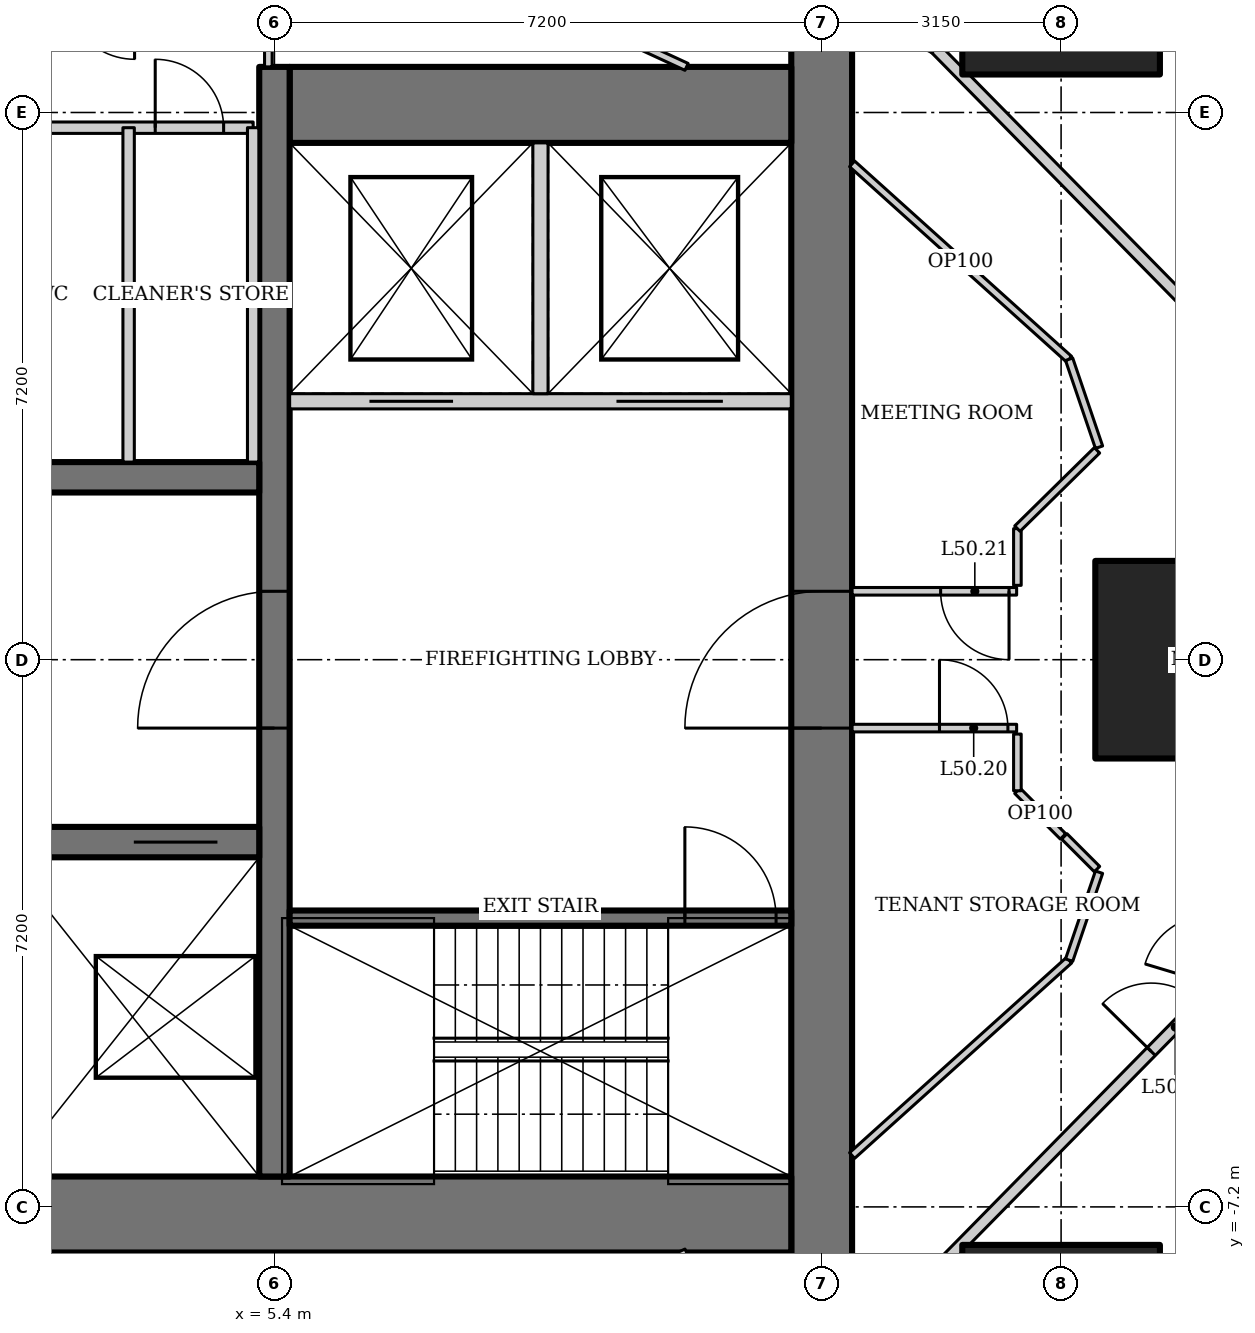
"""IFC4 building model, lengths in metres.
Left out: names, types, materials, properties, quantities, classifications, styles, units other than length and angle.
Written with IfcOpenShell. Run it as: python <this file> out.ifc"""

import sys

from ifc_helpers import new_model, si_unit, direction, frame, frame_2d, origin, origin_2d, place, context, subcontext, project, spatial, rectangle, hollow_rectangle, extrude, element, fill, save


model = new_model("IFC4")
c1 = context("Model", 3, precision=1e-05, world=origin(), true_north=direction((0.0, 1.0)))
c2 = subcontext(c1, "Body", "Model", "MODEL_VIEW")
j1 = project(units=[si_unit("LENGTHUNIT", "METRE"), si_unit("PLANEANGLEUNIT", "RADIAN")], contexts=[c1])
p1 = place(None, origin())
s1 = spatial("IfcSite", under=j1, at=p1, CompositionType="ELEMENT")
p2 = place(p1, origin())
s2 = spatial("IfcBuilding", under=s1, at=p2, CompositionType="ELEMENT")
p3 = place(p2, frame((0.0, 0.0, 215.8)))
s3 = spatial("IfcBuildingStorey", under=s2, at=p3, CompositionType="ELEMENT", Elevation=215.8)
for number, where, z_axis, x_axis in (
    (1, (17.5, 0.0, 0.0), (0.0, 0.0, 1.0), (1.0, 0.0, 0.0)),
    (2, (15.75, 9.0, 0.0), (0.0, 0.0, 1.0), (1.0, 0.0, 0.0)),
    (3, (15.75, -9.0, 0.0), (0.0, 0.0, 1.0), (1.0, 0.0, 0.0)),
):
    element("IfcColumn", number, at=place(p3, frame(where, z_axis=z_axis, x_axis=x_axis)), inside=s3, PredefinedType="COLUMN", context=c2, shape_type="SweptSolid", body=[
        extrude(hollow_rectangle(XDim=2.6, YDim=2.6, WallThickness=0.13, at=origin_2d()), origin(), (0.0, 0.0, 1.0), 4.2),
    ])
p4 = place(p3, frame((12.6, -13.0, 0.0), z_axis=(0.0, 0.0, 1.0), x_axis=(0.0, 1.0, 0.0)))
e4 = element("IfcWall", 4, at=p4, inside=s3, PredefinedType="SHEAR", context=c2, shape_type="SweptSolid", body=[
    extrude(rectangle(XDim=26.0, YDim=0.8, at=frame_2d((13.0, 0.0))), origin(), (0.0, 0.0, 1.0), 4.2),
])
p5 = place(p4, frame((12.1, 0.0, 0.0)))
e5 = element("IfcOpeningElement", 5, at=p5, cuts=e4, PredefinedType="OPENING", context=c2, shape_type="SweptSolid", body=[
    extrude(rectangle(XDim=1.8, YDim=2.1, at=frame_2d((0.9, 1.05))), frame((0.0, 0.41, 0.0), z_axis=(0.0, -1.0, 0.0), x_axis=(1.0, 0.0, 0.0)), (0.0, 0.0, 1.0), 0.82),
])
p6 = place(p3, frame((-12.2, -7.3, 0.0), z_axis=(0.0, 0.0, 1.0), x_axis=(1.0, 0.0, 0.0)))
e6 = element("IfcWall", 6, at=p6, inside=s3, PredefinedType="SHEAR", context=c2, shape_type="SweptSolid", body=[
    extrude(rectangle(XDim=24.4, YDim=1.0, at=frame_2d((12.2, 0.0))), origin(), (0.0, 0.0, 1.0), 4.2),
])
p7 = place(p3, frame((12.2, 7.3, 0.0), z_axis=(0.0, 0.0, 1.0), x_axis=(-1.0, 0.0, 0.0)))
e7 = element("IfcWall", 7, at=p7, inside=s3, PredefinedType="SHEAR", context=c2, shape_type="SweptSolid", body=[
    extrude(rectangle(XDim=6.6, YDim=1.0, at=frame_2d((3.3, 0.0))), origin(), (0.0, 0.0, 1.0), 4.2),
])
p8 = place(p3, frame((5.4, -6.8, 0.0), z_axis=(0.0, 0.0, 1.0), x_axis=(0.0, 1.0, 0.0)))
e8 = element("IfcWall", 8, at=p8, inside=s3, PredefinedType="SHEAR", context=c2, shape_type="SweptSolid", body=[
    extrude(rectangle(XDim=14.6, YDim=0.4, at=frame_2d((7.3, 0.0))), origin(), (0.0, 0.0, 1.0), 4.2),
])
p9 = place(p8, frame((5.9, 0.0, 0.0)))
e9 = element("IfcOpeningElement", 9, at=p9, cuts=e8, PredefinedType="OPENING", context=c2, shape_type="SweptSolid", body=[
    extrude(rectangle(XDim=1.8, YDim=2.1, at=frame_2d((0.9, 1.05))), frame((0.0, 0.21, 0.0), z_axis=(0.0, -1.0, 0.0), x_axis=(1.0, 0.0, 0.0)), (0.0, 0.0, 1.0), 0.42),
])
p10 = place(p3, frame((-5.2, -2.4, 0.0), z_axis=(0.0, 0.0, 1.0), x_axis=(1.0, 0.0, 0.0)))
e10 = element("IfcWall", 10, at=p10, inside=s3, PredefinedType="SHEAR", context=c2, shape_type="SweptSolid", body=[
    extrude(rectangle(XDim=10.4, YDim=0.4, at=frame_2d((5.2, 0.0))), origin(), (0.0, 0.0, 1.0), 4.2),
])
p11 = place(p10, frame((1.683, 0.0, 0.0)))
e11 = element("IfcOpeningElement", 11, at=p11, cuts=e10, PredefinedType="OPENING", context=c2, shape_type="SweptSolid", body=[
    extrude(rectangle(XDim=1.1, YDim=2.2, at=frame_2d((0.55, 1.1))), frame((0.0, 0.21, 0.0), z_axis=(0.0, -1.0, 0.0), x_axis=(1.0, 0.0, 0.0)), (0.0, 0.0, 1.0), 0.42),
])
p12 = place(p10, frame((5.217, 0.0, 0.0)))
e12 = element("IfcOpeningElement", 12, at=p12, cuts=e10, PredefinedType="OPENING", context=c2, shape_type="SweptSolid", body=[
    extrude(rectangle(XDim=1.1, YDim=2.2, at=frame_2d((0.55, 1.1))), frame((0.0, 0.21, 0.0), z_axis=(0.0, -1.0, 0.0), x_axis=(1.0, 0.0, 0.0)), (0.0, 0.0, 1.0), 0.42),
])
p13 = place(p10, frame((8.75, 0.0, 0.0)))
e13 = element("IfcOpeningElement", 13, at=p13, cuts=e10, PredefinedType="OPENING", context=c2, shape_type="SweptSolid", body=[
    extrude(rectangle(XDim=1.1, YDim=2.2, at=frame_2d((0.55, 1.1))), frame((0.0, 0.21, 0.0), z_axis=(0.0, -1.0, 0.0), x_axis=(1.0, 0.0, 0.0)), (0.0, 0.0, 1.0), 0.42),
])
p14 = place(p3, frame((5.2, 2.4, 0.0), z_axis=(0.0, 0.0, 1.0), x_axis=(-1.0, 0.0, 0.0)))
e14 = element("IfcWall", 14, at=p14, inside=s3, PredefinedType="SHEAR", context=c2, shape_type="SweptSolid", body=[
    extrude(rectangle(XDim=10.4, YDim=0.4, at=frame_2d((5.2, 0.0))), origin(), (0.0, 0.0, 1.0), 4.2),
])
p15 = place(p3, frame((5.6, -3.4, 0.0), z_axis=(0.0, 0.0, 1.0), x_axis=(1.0, 0.0, 0.0)))
e15 = element("IfcWall", 15, at=p15, inside=s3, PredefinedType="SHEAR", context=c2, shape_type="SweptSolid", body=[
    extrude(rectangle(XDim=6.6, YDim=0.2, at=frame_2d((3.3, 0.0))), origin(), (0.0, 0.0, 1.0), 4.2),
])
p16 = place(p15, frame((5.2, 0.0, 0.0)))
e16 = element("IfcOpeningElement", 16, at=p16, cuts=e15, PredefinedType="OPENING", context=c2, shape_type="SweptSolid", body=[
    extrude(rectangle(XDim=1.2, YDim=2.1, at=frame_2d((0.6, 1.05))), frame((0.0, 0.11, 0.0), z_axis=(0.0, -1.0, 0.0), x_axis=(1.0, 0.0, 0.0)), (0.0, 0.0, 1.0), 0.22),
])
p17 = place(p3, frame((12.2, 3.4, 0.0), z_axis=(0.0, 0.0, 1.0), x_axis=(-1.0, 0.0, 0.0)))
e17 = element("IfcWall", 17, at=p17, inside=s3, PredefinedType="SOLIDWALL", context=c2, shape_type="SweptSolid", body=[
    extrude(rectangle(XDim=6.6, YDim=0.2, at=frame_2d((3.3, 0.0))), origin(), (0.0, 0.0, 1.0), 4.2),
])
p18 = place(p17, frame((4.45, 0.0, 0.0)))
e18 = element("IfcOpeningElement", 18, at=p18, cuts=e17, PredefinedType="OPENING", context=c2, shape_type="SweptSolid", body=[
    extrude(rectangle(XDim=1.1, YDim=2.2, at=frame_2d((0.55, 1.1))), frame((0.0, 0.11, 0.0), z_axis=(0.0, -1.0, 0.0), x_axis=(1.0, 0.0, 0.0)), (0.0, 0.0, 1.0), 0.22),
])
p19 = place(p17, frame((0.9, 0.0, 0.0)))
e19 = element("IfcOpeningElement", 19, at=p19, cuts=e17, PredefinedType="OPENING", context=c2, shape_type="SweptSolid", body=[
    extrude(rectangle(XDim=1.4, YDim=2.2, at=frame_2d((0.7, 1.1))), frame((0.0, 0.11, 0.0), z_axis=(0.0, -1.0, 0.0), x_axis=(1.0, 0.0, 0.0)), (0.0, 0.0, 1.0), 0.22),
])
p20 = place(p3, frame((8.9, 3.5, 0.0), z_axis=(0.0, 0.0, 1.0), x_axis=(0.0, 1.0, 0.0)))
e20 = element("IfcWall", 20, at=p20, inside=s3, PredefinedType="SOLIDWALL", context=c2, shape_type="SweptSolid", body=[
    extrude(rectangle(XDim=3.3, YDim=0.2, at=frame_2d((1.65, 0.0))), origin(), (0.0, 0.0, 1.0), 4.2),
])
p21 = place(p3, frame((17.673, 4.406, 0.0), z_axis=(0.0, 0.0, 1.0), x_axis=(-0.701111216625, 0.713051934941, 0.0)))
e21 = element("IfcWall", 21, at=p21, inside=s3, PredefinedType="PARTITIONING", context=c2, shape_type="SweptSolid", body=[
    extrude(rectangle(XDim=5.112, YDim=0.15, at=frame_2d((2.556, 0.0))), origin(), (0.0, 0.0, 1.0), 4.05),
])
p22 = place(p3, frame((14.089, 8.051, 0.0), z_axis=(0.0, 0.0, 1.0), x_axis=(-0.886174439647, 0.463351769735, 0.0)))
e22 = element("IfcWall", 22, at=p22, inside=s3, PredefinedType="PARTITIONING", context=c2, shape_type="SweptSolid", body=[
    extrude(rectangle(XDim=4.735, YDim=0.15, at=frame_2d((2.367, 0.0))), origin(), (0.0, 0.0, 1.0), 4.05),
])
p23 = place(p3, frame((14.089, -8.051, 0.0), z_axis=(0.0, 0.0, 1.0), x_axis=(0.701111216625, 0.713051934941, 0.0)))
e23 = element("IfcWall", 23, at=p23, inside=s3, PredefinedType="PARTITIONING", context=c2, shape_type="SweptSolid", body=[
    extrude(rectangle(XDim=5.112, YDim=0.15, at=frame_2d((2.556, 0.0))), origin(), (0.0, 0.0, 1.0), 4.05),
])
p24 = place(p23, frame((4.061, 0.0, 0.0)))
e24 = element("IfcOpeningElement", 24, at=p24, cuts=e23, PredefinedType="OPENING", context=c2, shape_type="SweptSolid", body=[
    extrude(rectangle(XDim=0.9, YDim=2.1, at=frame_2d((0.45, 1.05))), frame((0.0, 0.085, 0.0), z_axis=(0.0, -1.0, 0.0), x_axis=(1.0, 0.0, 0.0)), (0.0, 0.0, 1.0), 0.17),
])
p25 = place(p3, frame((-5.12, 7.0, 0.0), z_axis=(0.0, 0.0, 1.0), x_axis=(1.0, 0.0, 0.0)))
e25 = element("IfcWall", 25, at=p25, inside=s3, PredefinedType="SOLIDWALL", context=c2, shape_type="SweptSolid", body=[
    extrude(rectangle(XDim=10.24, YDim=0.15, at=frame_2d((5.12, 0.0))), origin(), (0.0, 0.0, 1.0), 4.05),
])
p26 = place(p25, frame((0.5, 0.0, 0.0)))
e26 = element("IfcOpeningElement", 26, at=p26, cuts=e25, PredefinedType="OPENING", context=c2, shape_type="SweptSolid", body=[
    extrude(rectangle(XDim=1.0, YDim=2.1, at=frame_2d((0.5, 1.05))), frame((0.0, 0.085, 0.0), z_axis=(0.0, -1.0, 0.0), x_axis=(1.0, 0.0, 0.0)), (0.0, 0.0, 1.0), 0.17),
])
p27 = place(p25, frame((3.248, 0.0, 0.0)))
e27 = element("IfcOpeningElement", 27, at=p27, cuts=e25, PredefinedType="OPENING", context=c2, shape_type="SweptSolid", body=[
    extrude(rectangle(XDim=0.9, YDim=2.1, at=frame_2d((0.45, 1.05))), frame((0.0, 0.085, 0.0), z_axis=(0.0, -1.0, 0.0), x_axis=(1.0, 0.0, 0.0)), (0.0, 0.0, 1.0), 0.17),
])
p28 = place(p25, frame((6.525, 0.0, 0.0)))
e28 = element("IfcOpeningElement", 28, at=p28, cuts=e25, PredefinedType="OPENING", context=c2, shape_type="SweptSolid", body=[
    extrude(rectangle(XDim=0.9, YDim=2.1, at=frame_2d((0.45, 1.05))), frame((0.0, 0.085, 0.0), z_axis=(0.0, -1.0, 0.0), x_axis=(1.0, 0.0, 0.0)), (0.0, 0.0, 1.0), 0.17),
])
p29 = place(p25, frame((8.952, 0.0, 0.0)))
e29 = element("IfcOpeningElement", 29, at=p29, cuts=e25, PredefinedType="OPENING", context=c2, shape_type="SweptSolid", body=[
    extrude(rectangle(XDim=0.9, YDim=2.1, at=frame_2d((0.45, 1.05))), frame((0.0, 0.085, 0.0), z_axis=(0.0, -1.0, 0.0), x_axis=(1.0, 0.0, 0.0)), (0.0, 0.0, 1.0), 0.17),
])
for number, where, z_axis, x_axis in (
    (30, (5.12, 2.6, 0.0), (0.0, 0.0, 1.0), (0.0, 1.0, 0.0)),
    (31, (3.482, 2.6, 0.0), (0.0, 0.0, 1.0), (0.0, 1.0, 0.0)),
):
    element("IfcWall", number, at=place(p3, frame(where, z_axis=z_axis, x_axis=x_axis)), inside=s3, PredefinedType="SOLIDWALL", context=c2, shape_type="SweptSolid", body=[
        extrude(rectangle(XDim=4.4, YDim=0.15, at=frame_2d((2.2, 0.0))), origin(), (0.0, 0.0, 1.0), 4.05),
    ])
p30 = place(p3, frame((10.823, -7.8, 0.0), z_axis=(0.0, 0.0, 1.0), x_axis=(-0.907759689292, -0.419490579748, 0.0)))
e32 = element("IfcWall", 32, at=p30, inside=s3, PredefinedType="PARTITIONING", context=c2, shape_type="SweptSolid", body=[
    extrude(rectangle(XDim=2.506, YDim=0.1, at=frame_2d((1.253, 0.0))), origin(), (0.0, 0.0, 1.0), 4.05),
])
for number, where, z_axis, x_axis in (
    (33, (15.856, -3.953, 0.0), (0.0, 0.0, 1.0), (-0.743, -0.669, 0.0)),
    (34, (13.0, 6.524, 0.0), (0.0, 0.0, 1.0), (0.743, -0.669, 0.0)),
):
    element("IfcWall", number, at=place(p3, frame(where, z_axis=z_axis, x_axis=x_axis)), inside=s3, PredefinedType="PARTITIONING", context=c2, shape_type="SweptSolid", body=[
        extrude(rectangle(XDim=3.843, YDim=0.1, at=frame_2d((1.921, 0.0))), origin(), (0.0, 0.0, 1.0), 4.05),
    ])
p31 = place(p3, frame((5.32, 7.8, 0.0), z_axis=(0.0, 0.0, 1.0), x_axis=(0.0, 1.0, 0.0)))
e35 = element("IfcWall", 35, at=p31, inside=s3, PredefinedType="PARTITIONING", context=c2, shape_type="SweptSolid", body=[
    extrude(rectangle(XDim=1.0, YDim=0.1, at=frame_2d((0.5, 0.0))), origin(), (0.0, 0.0, 1.0), 4.05),
])
p32 = place(p3, frame((8.548, 8.851, 0.0), z_axis=(0.0, 0.0, 1.0), x_axis=(0.907759689292, -0.419490579748, 0.0)))
e36 = element("IfcWall", 36, at=p32, inside=s3, PredefinedType="PARTITIONING", context=c2, shape_type="SweptSolid", body=[
    extrude(rectangle(XDim=2.506, YDim=0.1, at=frame_2d((1.253, 0.0))), origin(), (0.0, 0.0, 1.0), 4.05),
])
p33 = place(p3, frame((13.0, -0.9, 0.0), z_axis=(0.0, 0.0, 1.0), x_axis=(1.0, 0.0, 0.0)))
e37 = element("IfcWall", 37, at=p33, inside=s3, PredefinedType="PARTITIONING", context=c2, shape_type="SweptSolid", body=[
    extrude(rectangle(XDim=2.165, YDim=0.1, at=frame_2d((1.083, 0.0))), origin(), (0.0, 0.0, 1.0), 4.05),
])
p34 = place(p33, frame((1.15, 0.0, 0.0)))
e38 = element("IfcOpeningElement", 38, at=p34, cuts=e37, PredefinedType="OPENING", context=c2, shape_type="SweptSolid", body=[
    extrude(rectangle(XDim=0.9, YDim=2.1, at=frame_2d((0.45, 1.05))), frame((0.0, 0.06, 0.0), z_axis=(0.0, -1.0, 0.0), x_axis=(1.0, 0.0, 0.0)), (0.0, 0.0, 1.0), 0.12),
])
for number, where, z_axis, x_axis in (
    (39, (16.249, -2.796, 0.0), (0.0, 0.0, 1.0), (-0.322, -0.947, 0.0)),
    (40, (15.856, 3.953, 0.0), (0.0, 0.0, 1.0), (0.322, -0.947, 0.0)),
):
    element("IfcWall", number, at=place(p3, frame(where, z_axis=z_axis, x_axis=x_axis)), inside=s3, PredefinedType="PARTITIONING", context=c2, shape_type="SweptSolid", body=[
        extrude(rectangle(XDim=1.223, YDim=0.1, at=frame_2d((0.611, 0.0))), origin(), (0.0, 0.0, 1.0), 4.05),
    ])
p35 = place(p3, frame((15.165, 0.9, 0.0), z_axis=(0.0, 0.0, 1.0), x_axis=(-1.0, 0.0, 0.0)))
e41 = element("IfcWall", 41, at=p35, inside=s3, PredefinedType="PARTITIONING", context=c2, shape_type="SweptSolid", body=[
    extrude(rectangle(XDim=2.165, YDim=0.1, at=frame_2d((1.083, 0.0))), origin(), (0.0, 0.0, 1.0), 4.05),
])
p36 = place(p35, frame((0.1, 0.0, 0.0)))
e42 = element("IfcOpeningElement", 42, at=p36, cuts=e41, PredefinedType="OPENING", context=c2, shape_type="SweptSolid", body=[
    extrude(rectangle(XDim=0.9, YDim=2.1, at=frame_2d((0.45, 1.05))), frame((0.0, 0.06, 0.0), z_axis=(0.0, -1.0, 0.0), x_axis=(1.0, 0.0, 0.0)), (0.0, 0.0, 1.0), 0.12),
])
p37 = place(p3, frame((15.775, -2.325, 0.0), z_axis=(0.0, 0.0, 1.0), x_axis=(-0.707106781187, 0.707106781187, 0.0)))
e43 = element("IfcWall", 43, at=p37, inside=s3, PredefinedType="PARTITIONING", context=c2, shape_type="SweptSolid", body=[
    extrude(rectangle(XDim=0.849, YDim=0.1, at=frame_2d((0.425, 0.0))), origin(), (0.0, 0.0, 1.0), 4.05),
])
p38 = place(p3, frame((15.175, -1.725, 0.0), z_axis=(0.0, 0.0, 1.0), x_axis=(0.0, 1.0, 0.0)))
e44 = element("IfcWall", 44, at=p38, inside=s3, PredefinedType="PARTITIONING", context=c2, shape_type="SweptSolid", body=[
    extrude(rectangle(XDim=0.746, YDim=0.1, at=frame_2d((0.373, 0.0))), origin(), (0.0, 0.0, 1.0), 4.05),
])
p39 = place(p3, frame((16.223, -2.755, 0.0), z_axis=(0.0, 0.0, 1.0), x_axis=(-0.707106781187, 0.707106781187, 0.0)))
e45 = element("IfcWall", 45, at=p39, inside=s3, PredefinedType="PARTITIONING", context=c2, shape_type="SweptSolid", body=[
    extrude(rectangle(XDim=0.608, YDim=0.1, at=frame_2d((0.304, 0.0))), origin(), (0.0, 0.0, 1.0), 4.05),
])
p40 = place(p3, frame((15.175, 0.978, 0.0), z_axis=(0.0, 0.0, 1.0), x_axis=(0.0, 1.0, 0.0)))
e46 = element("IfcWall", 46, at=p40, inside=s3, PredefinedType="PARTITIONING", context=c2, shape_type="SweptSolid", body=[
    extrude(rectangle(XDim=0.746, YDim=0.1, at=frame_2d((0.373, 0.0))), origin(), (0.0, 0.0, 1.0), 4.05),
])
p41 = place(p3, frame((15.175, 1.725, 0.0), z_axis=(0.0, 0.0, 1.0), x_axis=(0.712897698193, 0.701268045694, 0.0)))
e47 = element("IfcWall", 47, at=p41, inside=s3, PredefinedType="PARTITIONING", context=c2, shape_type="SweptSolid", body=[
    extrude(rectangle(XDim=1.469, YDim=0.1, at=frame_2d((0.735, 0.0))), origin(), (0.0, 0.0, 1.0), 4.05),
])
p42 = place(p9, origin())
e48 = element("IfcDoor", 48, at=p42, inside=s3, OperationType="DOUBLE_DOOR_DOUBLE_SWING", PredefinedType="DOOR", context=c2, shape_type="SweptSolid", body=[
    extrude(rectangle(XDim=1.8, YDim=2.1, at=frame_2d((0.9, 1.05))), frame((0.0, 0.025, 0.0), z_axis=(0.0, -1.0, 0.0), x_axis=(1.0, 0.0, 0.0)), (0.0, 0.0, 1.0), 0.05),
])
fill(e9, e48)
p43 = place(p16, origin())
e49 = element("IfcDoor", 49, at=p43, inside=s3, OperationType="SINGLE_SWING_RIGHT", PredefinedType="DOOR", context=c2, shape_type="SweptSolid", body=[
    extrude(rectangle(XDim=1.2, YDim=2.1, at=frame_2d((0.6, 1.05))), frame((0.0, 0.025, 0.0), z_axis=(0.0, -1.0, 0.0), x_axis=(1.0, 0.0, 0.0)), (0.0, 0.0, 1.0), 0.05),
])
fill(e16, e49)
p44 = place(p5, origin())
e50 = element("IfcDoor", 50, at=p44, inside=s3, OperationType="DOUBLE_DOOR_DOUBLE_SWING", PredefinedType="DOOR", context=c2, shape_type="SweptSolid", body=[
    extrude(rectangle(XDim=1.8, YDim=2.1, at=frame_2d((0.9, 1.05))), frame((0.0, 0.025, 0.0), z_axis=(0.0, -1.0, 0.0), x_axis=(1.0, 0.0, 0.0)), (0.0, 0.0, 1.0), 0.05),
])
fill(e5, e50)
p45 = place(p13, origin())
e51 = element("IfcDoor", 51, at=p45, inside=s3, OperationType="DOUBLE_DOOR_SLIDING", PredefinedType="DOOR", context=c2, shape_type="SweptSolid", body=[
    extrude(rectangle(XDim=1.1, YDim=2.2, at=frame_2d((0.55, 1.1))), frame((0.0, 0.025, 0.0), z_axis=(0.0, -1.0, 0.0), x_axis=(1.0, 0.0, 0.0)), (0.0, 0.0, 1.0), 0.05),
])
fill(e13, e51)
p46 = place(p18, origin())
e52 = element("IfcDoor", 52, at=p46, inside=s3, OperationType="DOUBLE_DOOR_SLIDING", PredefinedType="DOOR", context=c2, shape_type="SweptSolid", body=[
    extrude(rectangle(XDim=1.1, YDim=2.2, at=frame_2d((0.55, 1.1))), frame((0.0, 0.025, 0.0), z_axis=(0.0, -1.0, 0.0), x_axis=(1.0, 0.0, 0.0)), (0.0, 0.0, 1.0), 0.05),
])
fill(e18, e52)
p47 = place(p19, origin())
e53 = element("IfcDoor", 53, at=p47, inside=s3, OperationType="DOUBLE_DOOR_SLIDING", PredefinedType="DOOR", context=c2, shape_type="SweptSolid", body=[
    extrude(rectangle(XDim=1.4, YDim=2.2, at=frame_2d((0.7, 1.1))), frame((0.0, 0.025, 0.0), z_axis=(0.0, -1.0, 0.0), x_axis=(1.0, 0.0, 0.0)), (0.0, 0.0, 1.0), 0.05),
])
fill(e19, e53)
p48 = place(p29, origin())
e54 = element("IfcDoor", 54, at=p48, inside=s3, OperationType="SINGLE_SWING_LEFT", PredefinedType="DOOR", context=c2, shape_type="SweptSolid", body=[
    extrude(rectangle(XDim=0.9, YDim=2.1, at=frame_2d((0.45, 1.05))), frame((0.0, 0.025, 0.0), z_axis=(0.0, -1.0, 0.0), x_axis=(1.0, 0.0, 0.0)), (0.0, 0.0, 1.0), 0.05),
])
fill(e29, e54)
p49 = place(p34, origin())
e55 = element("IfcDoor", 55, at=p49, inside=s3, OperationType="SINGLE_SWING_LEFT", PredefinedType="DOOR", context=c2, shape_type="SweptSolid", body=[
    extrude(rectangle(XDim=0.9, YDim=2.1, at=frame_2d((0.45, 1.05))), frame((0.0, 0.025, 0.0), z_axis=(0.0, -1.0, 0.0), x_axis=(1.0, 0.0, 0.0)), (0.0, 0.0, 1.0), 0.05),
])
fill(e38, e55)
p50 = place(p36, origin())
e56 = element("IfcDoor", 56, at=p50, inside=s3, OperationType="SINGLE_SWING_LEFT", PredefinedType="DOOR", context=c2, shape_type="SweptSolid", body=[
    extrude(rectangle(XDim=0.9, YDim=2.1, at=frame_2d((0.45, 1.05))), frame((0.0, 0.025, 0.0), z_axis=(0.0, -1.0, 0.0), x_axis=(1.0, 0.0, 0.0)), (0.0, 0.0, 1.0), 0.05),
])
fill(e42, e56)
p51 = place(p24, origin())
e57 = element("IfcDoor", 57, at=p51, inside=s3, OperationType="SINGLE_SWING_LEFT", PredefinedType="DOOR", context=c2, shape_type="SweptSolid", body=[
    extrude(rectangle(XDim=0.9, YDim=2.1, at=frame_2d((0.45, 1.05))), frame((0.0, 0.025, 0.0), z_axis=(0.0, -1.0, 0.0), x_axis=(1.0, 0.0, 0.0)), (0.0, 0.0, 1.0), 0.05),
])
fill(e24, e57)
save(model, sys.argv[1])
